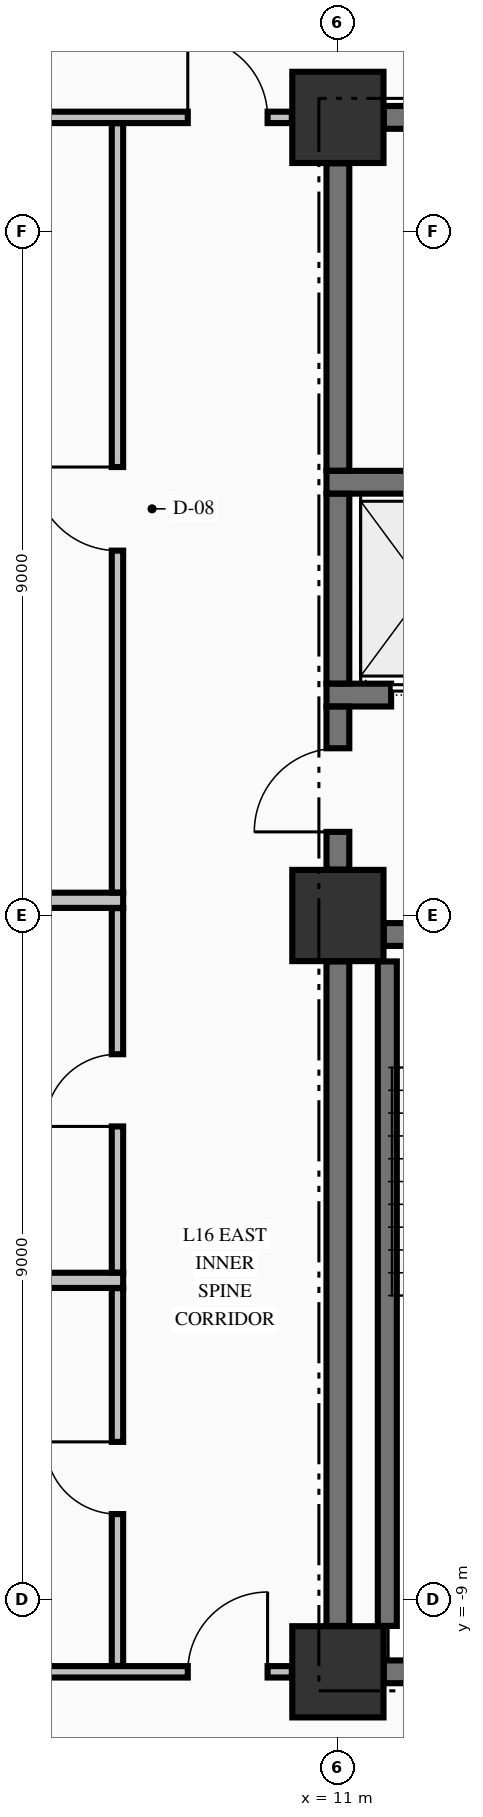
"""IFC4 building model, lengths in metres.
Left out: names, types, materials, properties, quantities, classifications, styles, units other than length and angle.
Written with IfcOpenShell. Run it as: python <this file> out.ifc"""

import sys

from ifc_helpers import new_model, si_unit, direction, frame, frame_2d, origin, origin_2d, place, context, subcontext, project, spatial, rectangle, extrude, element, fill, save


model = new_model("IFC4")
c1 = context("Model", 3, precision=1e-05, world=origin(), true_north=direction((0.0, 1.0)))
c2 = subcontext(c1, "Body", "Model", "MODEL_VIEW")
j1 = project(units=[si_unit("LENGTHUNIT", "METRE"), si_unit("PLANEANGLEUNIT", "RADIAN")], contexts=[c1])
p1 = place(None, origin())
s1 = spatial("IfcSite", under=j1, at=p1, CompositionType="ELEMENT")
p2 = place(p1, origin())
s2 = spatial("IfcBuilding", under=s1, at=p2, CompositionType="ELEMENT")
p3 = place(p2, frame((0.0, 0.0, 67.9)))
s3 = spatial("IfcBuildingStorey", under=s2, at=p3, CompositionType="ELEMENT", Elevation=67.9)
for number, where, z_axis, x_axis in (
    (1, (11.0, -9.95, -0.25), (0.0, 0.0, 1.0), (1.0, 0.0, 0.0)),
    (2, (11.0, 0.0, -0.25), (0.0, 0.0, 1.0), (1.0, 0.0, 0.0)),
    (3, (11.0, 10.5, -0.25), (0.0, 0.0, 1.0), (1.0, 0.0, 0.0)),
):
    element("IfcColumn", number, at=place(p3, frame(where, z_axis=z_axis, x_axis=x_axis)), inside=s3, PredefinedType="COLUMN", context=c2, shape_type="SweptSolid", body=[
        extrude(rectangle(XDim=1.2, YDim=1.2, at=origin_2d()), origin(), (0.0, 0.0, 1.0), 3.495),
    ])
p4 = place(p3, frame((11.604, -9.95, 0.0), z_axis=(0.0, 0.0, 1.0), x_axis=(1.0, 0.0, 0.0)))
e4 = element("IfcWall", 4, at=p4, inside=s3, PredefinedType="SHEAR", context=c2, shape_type="SweptSolid", body=[
    extrude(rectangle(XDim=3.096, YDim=0.3, at=frame_2d((1.548, 0.0))), origin(), (0.0, 0.0, 1.0), 3.245),
])
p5 = place(p3, frame((11.604, -0.25, 0.0), z_axis=(0.0, 0.0, 1.0), x_axis=(1.0, 0.0, 0.0)))
e5 = element("IfcWall", 5, at=p5, inside=s3, PredefinedType="SHEAR", context=c2, shape_type="SweptSolid", body=[
    extrude(rectangle(XDim=3.271, YDim=0.3, at=frame_2d((1.635, 0.0))), origin(), (0.0, 0.0, 1.0), 3.245),
])
p6 = place(p5, frame((0.996, 0.0, 0.0)))
e6 = element("IfcOpeningElement", 6, at=p6, cuts=e5, PredefinedType="OPENING", context=c2, shape_type="SweptSolid", body=[
    extrude(rectangle(XDim=1.1, YDim=2.15, at=frame_2d((0.55, 1.075))), frame((0.0, 0.16, 0.0), z_axis=(0.0, -1.0, 0.0), x_axis=(1.0, 0.0, 0.0)), (0.0, 0.0, 1.0), 0.32),
])
p7 = place(p3, frame((10.85, 2.9, 0.0), z_axis=(0.0, 0.0, 1.0), x_axis=(1.0, 0.0, 0.0)))
e7 = element("IfcWall", 7, at=p7, inside=s3, PredefinedType="SHEAR", context=c2, shape_type="SweptSolid", body=[
    extrude(rectangle(XDim=4.025, YDim=0.3, at=frame_2d((2.012, 0.0))), origin(), (0.0, 0.0, 1.0), 3.245),
])
p8 = place(p7, frame((0.85, 0.0, 0.0)))
e8 = element("IfcOpeningElement", 8, at=p8, cuts=e7, PredefinedType="OPENING", context=c2, shape_type="SweptSolid", body=[
    extrude(rectangle(XDim=1.1, YDim=2.2, at=frame_2d((0.55, 1.1))), frame((0.0, 0.16, 0.0), z_axis=(0.0, -1.0, 0.0), x_axis=(1.0, 0.0, 0.0)), (0.0, 0.0, 1.0), 0.32),
])
p9 = place(p3, frame((10.85, 5.7, 0.0), z_axis=(0.0, 0.0, 1.0), x_axis=(1.0, 0.0, 0.0)))
e9 = element("IfcWall", 9, at=p9, inside=s3, PredefinedType="SHEAR", context=c2, shape_type="SweptSolid", body=[
    extrude(rectangle(XDim=4.025, YDim=0.3, at=frame_2d((2.012, 0.0))), origin(), (0.0, 0.0, 1.0), 3.245),
])
p10 = place(p3, frame((11.604, 10.5, 0.0), z_axis=(0.0, 0.0, 1.0), x_axis=(1.0, 0.0, 0.0)))
e10 = element("IfcWall", 10, at=p10, inside=s3, PredefinedType="SHEAR", context=c2, shape_type="SweptSolid", body=[
    extrude(rectangle(XDim=3.096, YDim=0.3, at=frame_2d((1.548, 0.0))), origin(), (0.0, 0.0, 1.0), 3.245),
])
p11 = place(p10, frame((1.901, 0.0, 0.0)))
e11 = element("IfcOpeningElement", 11, at=p11, cuts=e10, PredefinedType="OPENING", context=c2, shape_type="SweptSolid", body=[
    extrude(rectangle(XDim=0.95, YDim=2.15, at=frame_2d((0.475, 1.075))), frame((0.0, 0.16, 0.0), z_axis=(0.0, -1.0, 0.0), x_axis=(1.0, 0.0, 0.0)), (0.0, 0.0, 1.0), 0.32),
])
p12 = place(p3, frame((-10.394, -9.95, 0.0), z_axis=(0.0, 0.0, 1.0), x_axis=(1.0, 0.0, 0.0)))
e12 = element("IfcWall", 12, at=p12, inside=s3, PredefinedType="PARTITIONING", context=c2, shape_type="SweptSolid", body=[
    extrude(rectangle(XDim=20.788, YDim=0.15, at=frame_2d((10.394, 0.0))), origin(), (0.0, 0.0, 1.0), 3.245),
])
p13 = place(p12, frame((0.319, 0.0, 0.0)))
e13 = element("IfcOpeningElement", 13, at=p13, cuts=e12, PredefinedType="OPENING", context=c2, shape_type="SweptSolid", body=[
    extrude(rectangle(XDim=1.05, YDim=2.15, at=frame_2d((0.525, 1.075))), frame((0.0, 0.085, 0.0), z_axis=(0.0, -1.0, 0.0), x_axis=(1.0, 0.0, 0.0)), (0.0, 0.0, 1.0), 0.17),
])
p14 = place(p12, frame((19.419, 0.0, 0.0)))
e14 = element("IfcOpeningElement", 14, at=p14, cuts=e12, PredefinedType="OPENING", context=c2, shape_type="SweptSolid", body=[
    extrude(rectangle(XDim=1.05, YDim=2.15, at=frame_2d((0.525, 1.075))), frame((0.0, 0.085, 0.0), z_axis=(0.0, -1.0, 0.0), x_axis=(1.0, 0.0, 0.0)), (0.0, 0.0, 1.0), 0.17),
])
p15 = place(p12, frame((13.369, 0.0, 0.0)))
e15 = element("IfcOpeningElement", 15, at=p15, cuts=e12, PredefinedType="OPENING", context=c2, shape_type="SweptSolid", body=[
    extrude(rectangle(XDim=0.95, YDim=2.15, at=frame_2d((0.475, 1.075))), frame((0.0, 0.085, 0.0), z_axis=(0.0, -1.0, 0.0), x_axis=(1.0, 0.0, 0.0)), (0.0, 0.0, 1.0), 0.17),
])
for number, where, z_axis, x_axis in (
    (16, (1.7, -4.8, 0.0), (0.0, 0.0, 1.0), (1.0, 0.0, 0.0)),
    (17, (1.7, 0.2, 0.0), (0.0, 0.0, 1.0), (1.0, 0.0, 0.0)),
):
    element("IfcWall", number, at=place(p3, frame(where, z_axis=z_axis, x_axis=x_axis)), inside=s3, PredefinedType="PARTITIONING", context=c2, shape_type="SweptSolid", body=[
        extrude(rectangle(XDim=6.475, YDim=0.2, at=frame_2d((3.238, 0.0))), origin(), (0.0, 0.0, 1.0), 3.245),
    ])
p16 = place(p3, frame((-10.394, 10.5, 0.0), z_axis=(0.0, 0.0, 1.0), x_axis=(1.0, 0.0, 0.0)))
e18 = element("IfcWall", 18, at=p16, inside=s3, PredefinedType="PARTITIONING", context=c2, shape_type="SweptSolid", body=[
    extrude(rectangle(XDim=20.788, YDim=0.15, at=frame_2d((10.394, 0.0))), origin(), (0.0, 0.0, 1.0), 3.245),
])
p17 = place(p16, frame((0.319, 0.0, 0.0)))
e19 = element("IfcOpeningElement", 19, at=p17, cuts=e18, PredefinedType="OPENING", context=c2, shape_type="SweptSolid", body=[
    extrude(rectangle(XDim=1.05, YDim=2.15, at=frame_2d((0.525, 1.075))), frame((0.0, 0.085, 0.0), z_axis=(0.0, -1.0, 0.0), x_axis=(1.0, 0.0, 0.0)), (0.0, 0.0, 1.0), 0.17),
])
p18 = place(p16, frame((19.419, 0.0, 0.0)))
e20 = element("IfcOpeningElement", 20, at=p18, cuts=e18, PredefinedType="OPENING", context=c2, shape_type="SweptSolid", body=[
    extrude(rectangle(XDim=1.05, YDim=2.15, at=frame_2d((0.525, 1.075))), frame((0.0, 0.085, 0.0), z_axis=(0.0, -1.0, 0.0), x_axis=(1.0, 0.0, 0.0)), (0.0, 0.0, 1.0), 0.17),
])
p19 = place(p3, frame((11.0, -9.346, 0.0), z_axis=(0.0, 0.0, 1.0), x_axis=(0.0, 1.0, 0.0)))
e21 = element("IfcWall", 21, at=p19, inside=s3, PredefinedType="SHEAR", context=c2, shape_type="SweptSolid", body=[
    extrude(rectangle(XDim=8.742, YDim=0.3, at=frame_2d((4.371, 0.0))), origin(), (0.0, 0.0, 1.0), 3.245),
])
p20 = place(p3, frame((11.0, 0.604, 0.0), z_axis=(0.0, 0.0, 1.0), x_axis=(0.0, 1.0, 0.0)))
e22 = element("IfcWall", 22, at=p20, inside=s3, PredefinedType="SHEAR", context=c2, shape_type="SweptSolid", body=[
    extrude(rectangle(XDim=2.144, YDim=0.3, at=frame_2d((1.072, 0.0))), origin(), (0.0, 0.0, 1.0), 3.245),
])
p21 = place(p20, frame((0.496, 0.0, 0.0)))
e23 = element("IfcOpeningElement", 23, at=p21, cuts=e22, PredefinedType="OPENING", context=c2, shape_type="SweptSolid", body=[
    extrude(rectangle(XDim=1.1, YDim=2.15, at=frame_2d((0.55, 1.075))), frame((0.0, 0.16, 0.0), z_axis=(0.0, -1.0, 0.0), x_axis=(1.0, 0.0, 0.0)), (0.0, 0.0, 1.0), 0.32),
])
p22 = place(p3, frame((11.0, 3.052, 0.0), z_axis=(0.0, 0.0, 1.0), x_axis=(0.0, 1.0, 0.0)))
e24 = element("IfcWall", 24, at=p22, inside=s3, PredefinedType="SHEAR", context=c2, shape_type="SweptSolid", body=[
    extrude(rectangle(XDim=2.496, YDim=0.3, at=frame_2d((1.248, 0.0))), origin(), (0.0, 0.0, 1.0), 3.245),
])
p23 = place(p3, frame((11.0, 5.852, 0.0), z_axis=(0.0, 0.0, 1.0), x_axis=(0.0, 1.0, 0.0)))
e25 = element("IfcWall", 25, at=p23, inside=s3, PredefinedType="SHEAR", context=c2, shape_type="SweptSolid", body=[
    extrude(rectangle(XDim=4.044, YDim=0.3, at=frame_2d((2.022, 0.0))), origin(), (0.0, 0.0, 1.0), 3.245),
])
p24 = place(p3, frame((11.65, -9.346, 0.0), z_axis=(0.0, 0.0, 1.0), x_axis=(0.0, 1.0, 0.0)))
e26 = element("IfcWall", 26, at=p24, inside=s3, PredefinedType="SOLIDWALL", context=c2, shape_type="SweptSolid", body=[
    extrude(rectangle(XDim=8.742, YDim=0.25, at=frame_2d((4.371, 0.0))), origin(), (0.0, 0.0, 1.0), 3.245),
])
p25 = place(p3, frame((8.1, -9.872, 0.0), z_axis=(0.0, 0.0, 1.0), x_axis=(0.0, 1.0, 0.0)))
e27 = element("IfcWall", 27, at=p25, inside=s3, PredefinedType="PARTITIONING", context=c2, shape_type="SweptSolid", body=[
    extrude(rectangle(XDim=4.969, YDim=0.15, at=frame_2d((2.484, 0.0))), origin(), (0.0, 0.0, 1.0), 3.245),
])
p26 = place(p25, frame((1.997, 0.0, 0.0)))
e28 = element("IfcOpeningElement", 28, at=p26, cuts=e27, PredefinedType="OPENING", context=c2, shape_type="SweptSolid", body=[
    extrude(rectangle(XDim=0.95, YDim=2.15, at=frame_2d((0.475, 1.075))), frame((0.0, 0.085, 0.0), z_axis=(0.0, -1.0, 0.0), x_axis=(1.0, 0.0, 0.0)), (0.0, 0.0, 1.0), 0.17),
])
p27 = place(p3, frame((8.1, -4.697, 0.0), z_axis=(0.0, 0.0, 1.0), x_axis=(0.0, 1.0, 0.0)))
e29 = element("IfcWall", 29, at=p27, inside=s3, PredefinedType="PARTITIONING", context=c2, shape_type="SweptSolid", body=[
    extrude(rectangle(XDim=4.794, YDim=0.15, at=frame_2d((2.397, 0.0))), origin(), (0.0, 0.0, 1.0), 3.245),
])
p28 = place(p27, frame((1.922, 0.0, 0.0)))
e30 = element("IfcOpeningElement", 30, at=p28, cuts=e29, PredefinedType="OPENING", context=c2, shape_type="SweptSolid", body=[
    extrude(rectangle(XDim=0.95, YDim=2.15, at=frame_2d((0.475, 1.075))), frame((0.0, 0.085, 0.0), z_axis=(0.0, -1.0, 0.0), x_axis=(1.0, 0.0, 0.0)), (0.0, 0.0, 1.0), 0.17),
])
p29 = place(p3, frame((8.1, 0.303, 0.0), z_axis=(0.0, 0.0, 1.0), x_axis=(0.0, 1.0, 0.0)))
e31 = element("IfcWall", 31, at=p29, inside=s3, PredefinedType="PARTITIONING", context=c2, shape_type="SweptSolid", body=[
    extrude(rectangle(XDim=10.119, YDim=0.15, at=frame_2d((5.06, 0.0))), origin(), (0.0, 0.0, 1.0), 3.245),
])
p30 = place(p29, frame((4.497, 0.0, 0.0)))
e32 = element("IfcOpeningElement", 32, at=p30, cuts=e31, PredefinedType="OPENING", context=c2, shape_type="SweptSolid", body=[
    extrude(rectangle(XDim=1.1, YDim=2.15, at=frame_2d((0.55, 1.075))), frame((0.0, 0.085, 0.0), z_axis=(0.0, -1.0, 0.0), x_axis=(1.0, 0.0, 0.0)), (0.0, 0.0, 1.0), 0.17),
])
p31 = place(p21, origin())
e33 = element("IfcDoor", 33, at=p31, inside=s3, OperationType="SINGLE_SWING_LEFT", PredefinedType="DOOR", context=c2, shape_type="SweptSolid", body=[
    extrude(rectangle(XDim=1.1, YDim=2.15, at=frame_2d((0.55, 1.075))), frame((0.0, 0.025, 0.0), z_axis=(0.0, -1.0, 0.0), x_axis=(1.0, 0.0, 0.0)), (0.0, 0.0, 1.0), 0.05),
])
fill(e23, e33)
p32 = place(p8, origin())
e34 = element("IfcDoor", 34, at=p32, inside=s3, OperationType="SLIDING_TO_RIGHT", PredefinedType="DOOR", context=c2, shape_type="SweptSolid", body=[
    extrude(rectangle(XDim=1.1, YDim=2.2, at=frame_2d((0.55, 1.1))), frame((0.0, 0.025, 0.0), z_axis=(0.0, -1.0, 0.0), x_axis=(1.0, 0.0, 0.0)), (0.0, 0.0, 1.0), 0.05),
])
fill(e8, e34)
p33 = place(p18, origin())
e35 = element("IfcDoor", 35, at=p33, inside=s3, OperationType="SINGLE_SWING_LEFT", PredefinedType="DOOR", context=c2, shape_type="SweptSolid", body=[
    extrude(rectangle(XDim=1.05, YDim=2.15, at=frame_2d((0.525, 1.075))), frame((0.0, 0.025, 0.0), z_axis=(0.0, -1.0, 0.0), x_axis=(1.0, 0.0, 0.0)), (0.0, 0.0, 1.0), 0.05),
])
fill(e20, e35)
p34 = place(p14, origin())
e36 = element("IfcDoor", 36, at=p34, inside=s3, OperationType="SINGLE_SWING_RIGHT", PredefinedType="DOOR", context=c2, shape_type="SweptSolid", body=[
    extrude(rectangle(XDim=1.05, YDim=2.15, at=frame_2d((0.525, 1.075))), frame((0.0, 0.025, 0.0), z_axis=(0.0, -1.0, 0.0), x_axis=(1.0, 0.0, 0.0)), (0.0, 0.0, 1.0), 0.05),
])
fill(e14, e36)
p35 = place(p30, origin())
e37 = element("IfcDoor", 37, at=p35, inside=s3, OperationType="SINGLE_SWING_RIGHT", PredefinedType="DOOR", context=c2, shape_type="SweptSolid", body=[
    extrude(rectangle(XDim=1.1, YDim=2.15, at=frame_2d((0.55, 1.075))), frame((0.0, 0.025, 0.0), z_axis=(0.0, -1.0, 0.0), x_axis=(1.0, 0.0, 0.0)), (0.0, 0.0, 1.0), 0.05),
])
fill(e32, e37)
p36 = place(p28, origin())
e38 = element("IfcDoor", 38, at=p36, inside=s3, OperationType="SINGLE_SWING_LEFT", PredefinedType="DOOR", context=c2, shape_type="SweptSolid", body=[
    extrude(rectangle(XDim=0.95, YDim=2.15, at=frame_2d((0.475, 1.075))), frame((0.0, 0.025, 0.0), z_axis=(0.0, -1.0, 0.0), x_axis=(1.0, 0.0, 0.0)), (0.0, 0.0, 1.0), 0.05),
])
fill(e30, e38)
p37 = place(p26, origin())
e39 = element("IfcDoor", 39, at=p37, inside=s3, OperationType="SINGLE_SWING_RIGHT", PredefinedType="DOOR", context=c2, shape_type="SweptSolid", body=[
    extrude(rectangle(XDim=0.95, YDim=2.15, at=frame_2d((0.475, 1.075))), frame((0.0, 0.025, 0.0), z_axis=(0.0, -1.0, 0.0), x_axis=(1.0, 0.0, 0.0)), (0.0, 0.0, 1.0), 0.05),
])
fill(e28, e39)
save(model, sys.argv[1])
